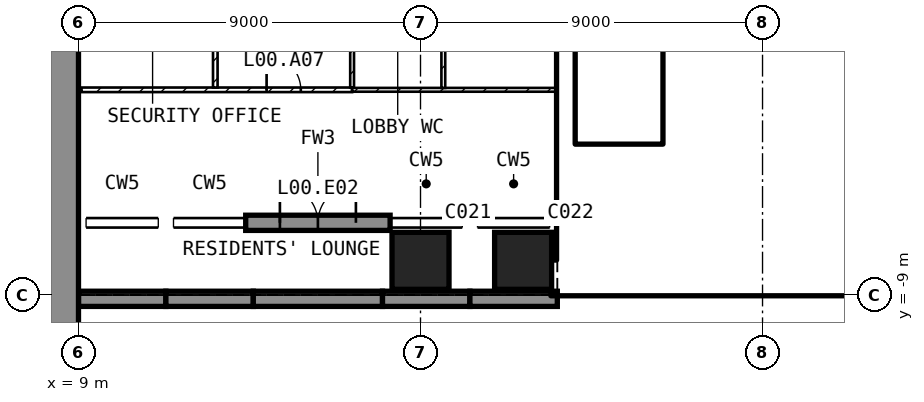
"""IFC4 building model, lengths in metres.
Left out: names, types, materials, properties, quantities, classifications, styles, units other than length and angle.
Written with IfcOpenShell. Run it as: python <this file> out.ifc"""

import sys

from ifc_helpers import new_model, si_unit, direction, frame, frame_2d, origin, origin_2d, place, context, subcontext, project, spatial, polyline, rectangle, outline, extrude, element, fill, save


model = new_model("IFC4")
c1 = context("Model", 3, precision=1e-05, world=origin(), true_north=direction((0.0, 1.0)))
c2 = subcontext(c1, "Body", "Model", "MODEL_VIEW")
j1 = project(units=[si_unit("LENGTHUNIT", "METRE"), si_unit("PLANEANGLEUNIT", "RADIAN")], contexts=[c1])
p1 = place(None, origin())
s1 = spatial("IfcSite", under=j1, at=p1, CompositionType="ELEMENT")
p2 = place(p1, origin())
s2 = spatial("IfcBuilding", under=s1, at=p2, CompositionType="ELEMENT")
p3 = place(p2, origin())
s3 = spatial("IfcBuildingStorey", under=s2, at=p3, CompositionType="ELEMENT", Elevation=0.0)
p4 = place(p3, frame((7.65, -25.2, -0.4), z_axis=(0.0, 0.0, 1.0), x_axis=(0.0, 1.0, 0.0)))
e1 = element("IfcWall", 1, at=p4, inside=s3, PredefinedType="SOLIDWALL", context=c2, shape_type="SweptSolid", body=[
    extrude(rectangle(XDim=50.4, YDim=2.7, at=frame_2d((25.2, 0.0))), origin(), (0.0, 0.0, 1.0), 20.0),
])
for number, where, z_axis, x_axis in (
    (2, (18.0, -8.1, -0.4), (0.0, 0.0, 1.0), (1.0, 0.0, 0.0)),
    (3, (20.7, -8.1, -0.4), (0.0, 0.0, 1.0), (1.0, 0.0, 0.0)),
):
    element("IfcColumn", number, at=place(p3, frame(where, z_axis=z_axis, x_axis=x_axis)), inside=s3, PredefinedType="COLUMN", context=c2, shape_type="SweptSolid", body=[
        extrude(rectangle(XDim=1.5, YDim=1.5, at=origin_2d()), origin(), (0.0, 0.0, 1.0), 15.1),
    ])
for number, where, z_axis, x_axis in (
    (4, (9.0, -8.9, 0.0), (0.0, -1.0, 0.0), (1.0, 0.0, 0.0)),
    (5, (11.3, -8.9, 0.0), (0.0, -1.0, 0.0), (1.0, 0.0, 0.0)),
):
    element("IfcWall", number, at=place(p3, frame(where, z_axis=z_axis, x_axis=x_axis)), inside=s3, PredefinedType="SOLIDWALL", context=c2, shape_type="SweptSolid", body=[
        extrude(outline(polyline([(0.0, 0.0), (0.3, 0.0), (0.3, 9.0), (0.316, 9.166), (0.365, 9.325), (0.443, 9.472), (0.549, 9.601), (0.678, 9.707), (0.825, 9.785), (0.984, 9.834), (1.15, 9.85), (1.316, 9.834), (1.475, 9.785), (1.622, 9.707), (1.751, 9.601), (1.857, 9.472), (1.935, 9.325), (1.984, 9.166), (2.0, 9.0), (2.0, 0.0), (2.3, 0.0), (2.3, 14.0), (0.0, 14.0), (0.0, 0.0)])), origin(), (0.0, 0.0, 1.0), 0.4),
    ])
p5 = place(p3, frame((13.6, -8.9, 0.0), z_axis=(0.0, -1.0, 0.0), x_axis=(1.0, 0.0, 0.0)))
e6 = element("IfcWall", 6, at=p5, inside=s3, PredefinedType="SOLIDWALL", context=c2, shape_type="SweptSolid", body=[
    extrude(outline(polyline([(0.0, 0.0), (0.3, 0.0), (0.3, 9.0), (0.327, 9.273), (0.406, 9.536), (0.536, 9.778), (0.71, 9.99), (0.922, 10.164), (1.164, 10.293), (1.427, 10.373), (1.7, 10.4), (1.973, 10.373), (2.236, 10.293), (2.478, 10.164), (2.69, 9.99), (2.864, 9.778), (2.993, 9.536), (3.073, 9.273), (3.1, 9.0), (3.1, 0.0), (3.4, 0.0), (3.4, 14.0), (0.0, 14.0), (0.0, 0.0)])), origin(), (0.0, 0.0, 1.0), 0.4),
])
p6 = place(p3, frame((13.4, -7.1, 0.0), z_axis=(0.0, 0.0, 1.0), x_axis=(1.0, 0.0, 0.0)))
e7 = element("IfcWall", 7, at=p6, inside=s3, PredefinedType="SOLIDWALL", context=c2, shape_type="SweptSolid", body=[
    extrude(rectangle(XDim=3.8, YDim=0.4, at=frame_2d((1.9, 0.0))), origin(), (0.0, 0.0, 1.0), 14.7),
])
p7 = place(p6, frame((0.9, 0.0, 0.0)))
e8 = element("IfcOpeningElement", 8, at=p7, cuts=e7, PredefinedType="OPENING", context=c2, shape_type="SweptSolid", body=[
    extrude(rectangle(XDim=2.0, YDim=2.4, at=frame_2d((1.0, 1.2))), frame((0.0, 0.21, 0.0), z_axis=(0.0, -1.0, 0.0), x_axis=(1.0, 0.0, 0.0)), (0.0, 0.0, 1.0), 0.42),
])
for number, where, z_axis, x_axis in (
    (9, (17.0, -8.9, 0.0), (0.0, -1.0, 0.0), (1.0, 0.0, 0.0)),
    (10, (19.3, -8.9, 0.0), (0.0, -1.0, 0.0), (1.0, 0.0, 0.0)),
):
    element("IfcWall", number, at=place(p3, frame(where, z_axis=z_axis, x_axis=x_axis)), inside=s3, PredefinedType="SOLIDWALL", context=c2, shape_type="SweptSolid", body=[
        extrude(outline(polyline([(0.0, 0.0), (0.3, 0.0), (0.3, 9.0), (0.316, 9.166), (0.365, 9.325), (0.443, 9.472), (0.549, 9.601), (0.678, 9.707), (0.825, 9.785), (0.984, 9.834), (1.15, 9.85), (1.316, 9.834), (1.475, 9.785), (1.622, 9.707), (1.751, 9.601), (1.857, 9.472), (1.935, 9.325), (1.984, 9.166), (2.0, 9.0), (2.0, 0.0), (2.3, 0.0), (2.3, 14.0), (0.0, 14.0), (0.0, 0.0)])), origin(), (0.0, 0.0, 1.0), 0.4),
    ])
p8 = place(p3, frame((21.45, -8.55, 0.0), z_axis=(0.0, 0.0, 1.0), x_axis=(1.0, 0.0, 0.0)))
e11 = element("IfcWall", 11, at=p8, inside=s3, PredefinedType="SHEAR", context=c2, shape_type="SweptSolid", body=[
    extrude(rectangle(XDim=10.95, YDim=0.9, at=frame_2d((5.475, 0.0))), origin(), (0.0, 0.0, 1.0), 14.7),
])
p9 = place(p8, frame((0.8, 0.0, 0.0)))
e12 = element("IfcOpeningElement", 12, at=p9, cuts=e11, PredefinedType="OPENING", context=c2, shape_type="SweptSolid", body=[
    extrude(rectangle(XDim=1.0, YDim=2.1, at=frame_2d((0.5, 1.05))), frame((0.0, 0.46, 0.0), z_axis=(0.0, -1.0, 0.0), x_axis=(1.0, 0.0, 0.0)), (0.0, 0.0, 1.0), 0.92),
])
p10 = place(p8, frame((7.45, 0.0, 0.0)))
e13 = element("IfcOpeningElement", 13, at=p10, cuts=e11, PredefinedType="OPENING", context=c2, shape_type="SweptSolid", body=[
    extrude(rectangle(XDim=1.2, YDim=2.1, at=frame_2d((0.6, 1.05))), frame((0.0, 0.46, 0.0), z_axis=(0.0, -1.0, 0.0), x_axis=(1.0, 0.0, 0.0)), (0.0, 0.0, 1.0), 0.92),
])
p11 = place(p3, frame((21.825, -8.1, 0.0), z_axis=(0.0, 0.0, 1.0), x_axis=(0.0, 1.0, 0.0)))
e14 = element("IfcWall", 14, at=p11, inside=s3, PredefinedType="SHEAR", context=c2, shape_type="SweptSolid", body=[
    extrude(rectangle(XDim=6.9, YDim=0.45, at=frame_2d((3.45, 0.0))), origin(), (0.0, 0.0, 1.0), 14.7),
])
p12 = place(p3, frame((24.5, -5.05, 0.0), z_axis=(0.0, 0.0, 1.0), x_axis=(0.0, 1.0, 0.0)))
e15 = element("IfcWall", 15, at=p12, inside=s3, PredefinedType="SOLIDWALL", context=c2, shape_type="SweptSolid", body=[
    extrude(rectangle(XDim=3.7, YDim=0.2, at=frame_2d((1.85, 0.0))), origin(), (0.0, 0.0, 1.0), 14.7),
])
p13 = place(p12, frame((0.1, 0.0, 0.0)))
e16 = element("IfcOpeningElement", 16, at=p13, cuts=e15, PredefinedType="OPENING", context=c2, shape_type="SweptSolid", body=[
    extrude(rectangle(XDim=0.8, YDim=2.1, at=frame_2d((0.4, 1.05))), frame((0.0, 0.11, 0.0), z_axis=(0.0, -1.0, 0.0), x_axis=(1.0, 0.0, 0.0)), (0.0, 0.0, 1.0), 0.22),
])
p14 = place(p3, frame((22.05, -5.15, 0.0), z_axis=(0.0, 0.0, 1.0), x_axis=(1.0, 0.0, 0.0)))
e17 = element("IfcWall", 17, at=p14, inside=s3, PredefinedType="SOLIDWALL", context=c2, shape_type="SweptSolid", body=[
    extrude(rectangle(XDim=6.3, YDim=0.2, at=frame_2d((3.15, 0.0))), origin(), (0.0, 0.0, 1.0), 14.7),
])
p15 = place(p14, frame((0.2, 0.0, 0.0)))
e18 = element("IfcOpeningElement", 18, at=p15, cuts=e17, PredefinedType="OPENING", context=c2, shape_type="SweptSolid", body=[
    extrude(rectangle(XDim=1.0, YDim=2.1, at=frame_2d((0.5, 1.05))), frame((0.0, 0.11, 0.0), z_axis=(0.0, -1.0, 0.0), x_axis=(1.0, 0.0, 0.0)), (0.0, 0.0, 1.0), 0.22),
])
p16 = place(p3, frame((28.25, -8.1, 0.0), z_axis=(0.0, 0.0, 1.0), x_axis=(0.0, 1.0, 0.0)))
e19 = element("IfcWall", 19, at=p16, inside=s3, PredefinedType="SOLIDWALL", context=c2, shape_type="SweptSolid", body=[
    extrude(rectangle(XDim=2.85, YDim=0.2, at=frame_2d((1.425, 0.0))), origin(), (0.0, 0.0, 1.0), 14.7),
])
p17 = place(p3, frame((24.6, -3.95, 0.0), z_axis=(0.0, 0.0, 1.0), x_axis=(1.0, 0.0, 0.0)))
e20 = element("IfcWall", 20, at=p17, inside=s3, PredefinedType="SOLIDWALL", context=c2, shape_type="SweptSolid", body=[
    extrude(rectangle(XDim=10.5, YDim=0.2, at=frame_2d((5.25, 0.0))), origin(), (0.0, 0.0, 1.0), 14.7),
])
p18 = place(p3, frame((26.5, -3.85, 0.0), z_axis=(0.0, 0.0, 1.0), x_axis=(0.0, 1.0, 0.0)))
e21 = element("IfcWall", 21, at=p18, inside=s3, PredefinedType="PARTITIONING", context=c2, shape_type="SweptSolid", body=[
    extrude(rectangle(XDim=2.3, YDim=0.2, at=frame_2d((1.15, 0.0))), origin(), (0.0, 0.0, 1.0), 14.7),
])
p19 = place(p3, frame((9.08, -3.6, 0.0), z_axis=(0.0, 0.0, 1.0), x_axis=(1.0, 0.0, 0.0)))
e22 = element("IfcWall", 22, at=p19, inside=s3, PredefinedType="PARTITIONING", context=c2, shape_type="SweptSolid", body=[
    extrude(rectangle(XDim=7.12, YDim=0.12, at=frame_2d((3.56, 0.0))), origin(), (0.0, 0.0, 1.0), 14.7),
])
p20 = place(p19, frame((4.87, 0.0, 0.0)))
e23 = element("IfcOpeningElement", 23, at=p20, cuts=e22, PredefinedType="OPENING", context=c2, shape_type="SweptSolid", body=[
    extrude(rectangle(XDim=0.9, YDim=2.1, at=frame_2d((0.45, 1.05))), frame((0.0, 0.07, 0.0), z_axis=(0.0, -1.0, 0.0), x_axis=(1.0, 0.0, 0.0)), (0.0, 0.0, 1.0), 0.14),
])
p21 = place(p3, frame((16.2, -3.6, 0.0), z_axis=(0.0, 0.0, 1.0), x_axis=(1.0, 0.0, 0.0)))
e24 = element("IfcWall", 24, at=p21, inside=s3, PredefinedType="PARTITIONING", context=c2, shape_type="SweptSolid", body=[
    extrude(rectangle(XDim=5.4, YDim=0.1, at=frame_2d((2.7, 0.0))), origin(), (0.0, 0.0, 1.0), 14.7),
])
p22 = place(p3, frame((12.6, -1.26, 0.0), z_axis=(0.0, 0.0, 1.0), x_axis=(0.0, -1.0, 0.0)))
e25 = element("IfcWall", 25, at=p22, inside=s3, PredefinedType="PARTITIONING", context=c2, shape_type="SweptSolid", body=[
    extrude(rectangle(XDim=2.28, YDim=0.12, at=frame_2d((1.14, 0.0))), origin(), (0.0, 0.0, 1.0), 14.7),
])
p23 = place(p3, frame((16.2, -1.26, 0.0), z_axis=(0.0, 0.0, 1.0), x_axis=(0.0, -1.0, 0.0)))
e26 = element("IfcWall", 26, at=p23, inside=s3, PredefinedType="PARTITIONING", context=c2, shape_type="SweptSolid", body=[
    extrude(rectangle(XDim=2.28, YDim=0.1, at=frame_2d((1.14, 0.0))), origin(), (0.0, 0.0, 1.0), 14.7),
])
p24 = place(p3, frame((18.6, -1.25, 0.0), z_axis=(0.0, 0.0, 1.0), x_axis=(0.0, -1.0, 0.0)))
e27 = element("IfcWall", 27, at=p24, inside=s3, PredefinedType="PARTITIONING", context=c2, shape_type="SweptSolid", body=[
    extrude(rectangle(XDim=2.3, YDim=0.1, at=frame_2d((1.15, 0.0))), origin(), (0.0, 0.0, 1.0), 14.7),
])
p25 = place(p7, origin())
e28 = element("IfcDoor", 28, at=p25, inside=s3, OperationType="DOUBLE_DOOR_SINGLE_SWING", PredefinedType="DOOR", context=c2, shape_type="SweptSolid", body=[
    extrude(rectangle(XDim=2.0, YDim=2.4, at=frame_2d((1.0, 1.2))), frame((0.0, 0.025, 0.0), z_axis=(0.0, -1.0, 0.0), x_axis=(1.0, 0.0, 0.0)), (0.0, 0.0, 1.0), 0.05),
])
fill(e8, e28)
p26 = place(p9, origin())
e29 = element("IfcDoor", 29, at=p26, inside=s3, OperationType="SINGLE_SWING_LEFT", PredefinedType="DOOR", context=c2, shape_type="SweptSolid", body=[
    extrude(rectangle(XDim=1.0, YDim=2.1, at=frame_2d((0.5, 1.05))), frame((0.0, 0.025, 0.0), z_axis=(0.0, -1.0, 0.0), x_axis=(1.0, 0.0, 0.0)), (0.0, 0.0, 1.0), 0.05),
])
fill(e12, e29)
p27 = place(p15, origin())
e30 = element("IfcDoor", 30, at=p27, inside=s3, OperationType="SINGLE_SWING_LEFT", PredefinedType="DOOR", context=c2, shape_type="SweptSolid", body=[
    extrude(rectangle(XDim=1.0, YDim=2.1, at=frame_2d((0.5, 1.05))), frame((0.0, 0.025, 0.0), z_axis=(0.0, -1.0, 0.0), x_axis=(1.0, 0.0, 0.0)), (0.0, 0.0, 1.0), 0.05),
])
fill(e18, e30)
p28 = place(p13, origin())
e31 = element("IfcDoor", 31, at=p28, inside=s3, OperationType="SINGLE_SWING_LEFT", PredefinedType="DOOR", context=c2, shape_type="SweptSolid", body=[
    extrude(rectangle(XDim=0.8, YDim=2.1, at=frame_2d((0.4, 1.05))), frame((0.0, 0.025, 0.0), z_axis=(0.0, -1.0, 0.0), x_axis=(1.0, 0.0, 0.0)), (0.0, 0.0, 1.0), 0.05),
])
fill(e16, e31)
p29 = place(p10, origin())
e32 = element("IfcDoor", 32, at=p29, inside=s3, OperationType="DOUBLE_DOOR_SINGLE_SWING", PredefinedType="DOOR", context=c2, shape_type="SweptSolid", body=[
    extrude(rectangle(XDim=1.2, YDim=2.1, at=frame_2d((0.6, 1.05))), frame((0.0, 0.025, 0.0), z_axis=(0.0, -1.0, 0.0), x_axis=(1.0, 0.0, 0.0)), (0.0, 0.0, 1.0), 0.05),
])
fill(e13, e32)
p30 = place(p20, origin())
e33 = element("IfcDoor", 33, at=p30, inside=s3, OperationType="SINGLE_SWING_LEFT", PredefinedType="DOOR", context=c2, shape_type="SweptSolid", body=[
    extrude(rectangle(XDim=0.9, YDim=2.1, at=frame_2d((0.45, 1.05))), frame((0.0, 0.025, 0.0), z_axis=(0.0, -1.0, 0.0), x_axis=(1.0, 0.0, 0.0)), (0.0, 0.0, 1.0), 0.05),
])
fill(e23, e33)
save(model, sys.argv[1])
